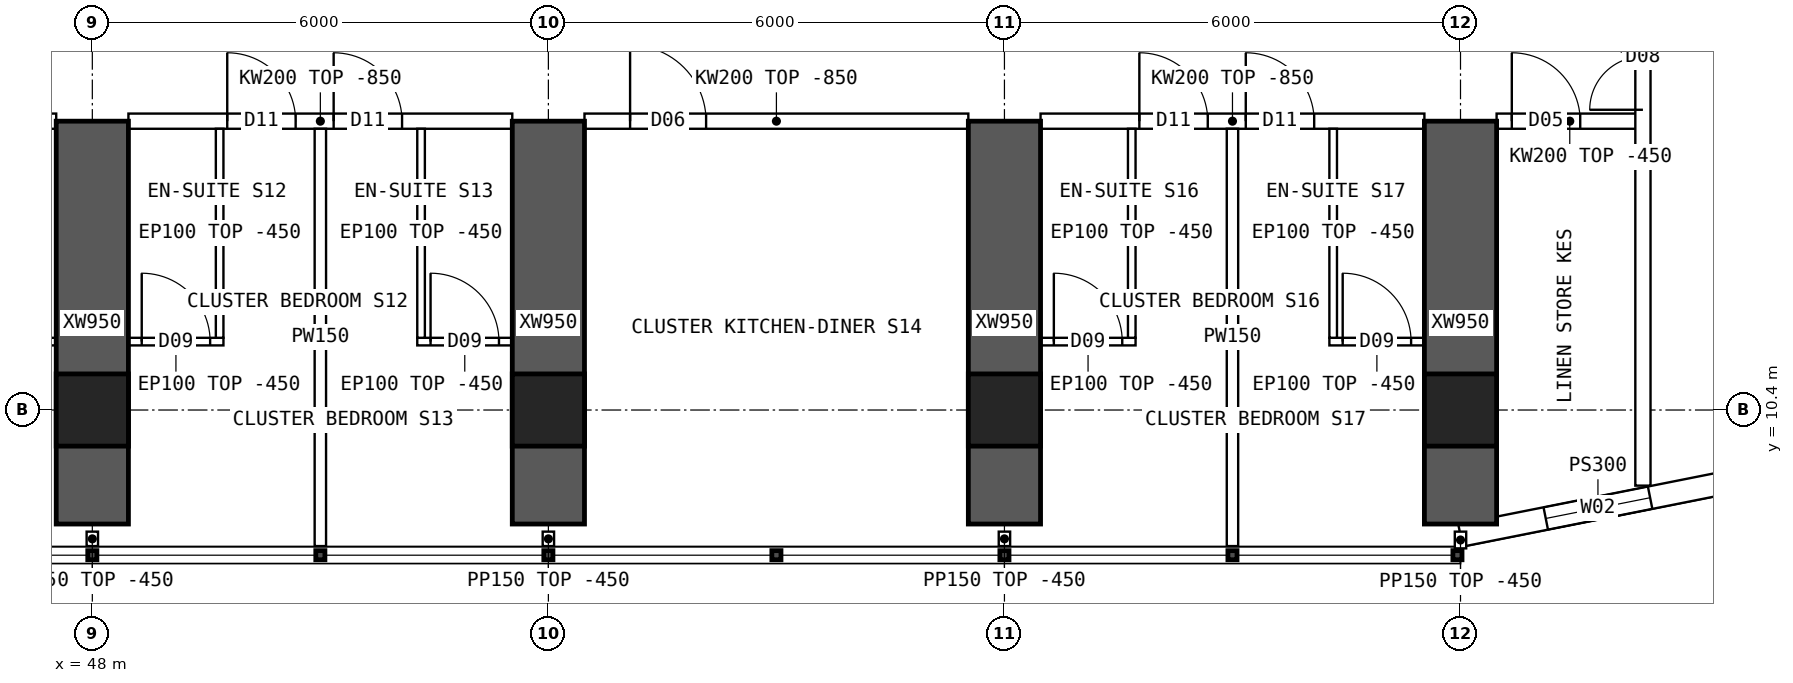
"""IFC4 building model, lengths in metres.
Left out: names, types, materials, properties, quantities, classifications, styles, units other than length and angle.
Written with IfcOpenShell. Run it as: python <this file> out.ifc"""

import sys

from ifc_helpers import new_model, si_unit, direction, frame, frame_2d, origin, origin_2d, place, context, subcontext, project, spatial, polyline, rectangle, hollow_rectangle, outline, extrude, element, fill, save


model = new_model("IFC4")
c1 = context("Model", 3, precision=1e-05, world=origin(), true_north=direction((0.0, 1.0)))
c2 = subcontext(c1, "Body", "Model", "MODEL_VIEW")
j1 = project(units=[si_unit("LENGTHUNIT", "METRE"), si_unit("PLANEANGLEUNIT", "RADIAN")], contexts=[c1])
p1 = place(None, origin())
s1 = spatial("IfcSite", under=j1, at=p1, CompositionType="ELEMENT")
p2 = place(p1, origin())
s2 = spatial("IfcBuilding", under=s1, at=p2, CompositionType="ELEMENT")
p3 = place(p2, frame((0.0, 0.0, 110.65)))
s3 = spatial("IfcBuildingStorey", under=s2, at=p3, CompositionType="ELEMENT", Elevation=110.65)
for number, where, z_axis, x_axis in (
    (1, (48.0, 10.4, 0.0), (0.0, 0.0, 1.0), (1.0, 0.0, 0.0)),
    (2, (54.0, 10.4, 0.0), (0.0, 0.0, 1.0), (1.0, 0.0, 0.0)),
    (3, (60.0, 10.4, 0.0), (0.0, 0.0, 1.0), (1.0, 0.0, 0.0)),
    (4, (66.0, 10.4, 0.0), (0.0, 0.0, 1.0), (1.0, 0.0, 0.0)),
):
    element("IfcColumn", number, at=place(p3, frame(where, z_axis=z_axis, x_axis=x_axis)), inside=s3, PredefinedType="COLUMN", context=c2, shape_type="SweptSolid", body=[
        extrude(hollow_rectangle(XDim=0.95, YDim=0.95, WallThickness=0.095, at=origin_2d()), origin(), (0.0, 0.0, 1.0), 3.75),
    ])
for number, where, z_axis, x_axis in (
    (5, (48.0, 8.9, 0.0), (0.0, 0.0, 1.0), (0.0, 1.0, 0.0)),
    (6, (54.0, 8.9, 0.0), (0.0, 0.0, 1.0), (0.0, 1.0, 0.0)),
    (7, (60.0, 8.9, 0.0), (0.0, 0.0, 1.0), (0.0, 1.0, 0.0)),
    (8, (66.0, 8.9, 0.0), (0.0, 0.0, 1.0), (0.0, 1.0, 0.0)),
):
    element("IfcWall", number, at=place(p3, frame(where, z_axis=z_axis, x_axis=x_axis)), inside=s3, PredefinedType="SHEAR", context=c2, shape_type="SweptSolid", body=[
        extrude(rectangle(XDim=5.3, YDim=0.95, at=frame_2d((2.65, 0.0))), origin(), (0.0, 0.0, 1.0), 3.75),
    ])
p4 = place(p3, frame((66.0, 8.75, 0.0), z_axis=(0.0, 0.0, 1.0), x_axis=(0.980791473772, 0.195059183267, 0.0)))
e9 = element("IfcWall", 9, at=p4, inside=s3, PredefinedType="SOLIDWALL", context=c2, shape_type="SweptSolid", body=[
    extrude(outline(polyline([(-0.03, -0.15), (3.717, -0.15), (3.657, 0.15), (0.03, 0.15), (-0.03, -0.15)])), origin(), (0.0, 0.0, 1.0), 3.3),
])
p5 = place(p4, frame((1.144, 0.0, 0.9)))
e10 = element("IfcOpeningElement", 10, at=p5, cuts=e9, PredefinedType="OPENING", context=c2, shape_type="SweptSolid", body=[
    extrude(rectangle(XDim=1.4, YDim=1.8, at=frame_2d((0.7, 0.9))), frame((0.0, 0.16, 0.0), z_axis=(0.0, -1.0, 0.0), x_axis=(1.0, 0.0, 0.0)), (0.0, 0.0, 1.0), 0.32),
])
p6 = place(p3, frame((42.475, 14.2, 0.0), z_axis=(0.0, 0.0, 1.0), x_axis=(1.0, 0.0, 0.0)))
e11 = element("IfcWall", 11, at=p6, inside=s3, PredefinedType="SOLIDWALL", context=c2, shape_type="SweptSolid", body=[
    extrude(outline(polyline([(0.0, 0.0), (5.05, 0.0), (5.05, 2.9), (0.0, 2.9), (0.0, 0.0)])), frame((0.0, 0.1, 0.0), z_axis=(0.0, -1.0, 0.0), x_axis=(1.0, 0.0, 0.0)), (0.0, 0.0, 1.0), 0.2),
])
p7 = place(p6, frame((1.3, 0.0, 0.0)))
e12 = element("IfcOpeningElement", 12, at=p7, cuts=e11, PredefinedType="OPENING", context=c2, shape_type="SweptSolid", body=[
    extrude(rectangle(XDim=0.9, YDim=2.1, at=frame_2d((0.45, 1.05))), frame((0.0, 0.11, 0.0), z_axis=(0.0, -1.0, 0.0), x_axis=(1.0, 0.0, 0.0)), (0.0, 0.0, 1.0), 0.22),
])
p8 = place(p6, frame((2.7, 0.0, 0.0)))
e13 = element("IfcOpeningElement", 13, at=p8, cuts=e11, PredefinedType="OPENING", context=c2, shape_type="SweptSolid", body=[
    extrude(rectangle(XDim=0.9, YDim=2.1, at=frame_2d((0.45, 1.05))), frame((0.0, 0.11, 0.0), z_axis=(0.0, -1.0, 0.0), x_axis=(1.0, 0.0, 0.0)), (0.0, 0.0, 1.0), 0.22),
])
p9 = place(p3, frame((48.475, 14.2, 0.0), z_axis=(0.0, 0.0, 1.0), x_axis=(1.0, 0.0, 0.0)))
e14 = element("IfcWall", 14, at=p9, inside=s3, PredefinedType="SOLIDWALL", context=c2, shape_type="SweptSolid", body=[
    extrude(outline(polyline([(0.0, 0.0), (5.05, 0.0), (5.05, 2.9), (0.0, 2.9), (0.0, 0.0)])), frame((0.0, 0.1, 0.0), z_axis=(0.0, -1.0, 0.0), x_axis=(1.0, 0.0, 0.0)), (0.0, 0.0, 1.0), 0.2),
])
p10 = place(p9, frame((1.3, 0.0, 0.0)))
e15 = element("IfcOpeningElement", 15, at=p10, cuts=e14, PredefinedType="OPENING", context=c2, shape_type="SweptSolid", body=[
    extrude(rectangle(XDim=0.9, YDim=2.1, at=frame_2d((0.45, 1.05))), frame((0.0, 0.11, 0.0), z_axis=(0.0, -1.0, 0.0), x_axis=(1.0, 0.0, 0.0)), (0.0, 0.0, 1.0), 0.22),
])
p11 = place(p9, frame((2.7, 0.0, 0.0)))
e16 = element("IfcOpeningElement", 16, at=p11, cuts=e14, PredefinedType="OPENING", context=c2, shape_type="SweptSolid", body=[
    extrude(rectangle(XDim=0.9, YDim=2.1, at=frame_2d((0.45, 1.05))), frame((0.0, 0.11, 0.0), z_axis=(0.0, -1.0, 0.0), x_axis=(1.0, 0.0, 0.0)), (0.0, 0.0, 1.0), 0.22),
])
p12 = place(p3, frame((54.475, 14.2, 0.0), z_axis=(0.0, 0.0, 1.0), x_axis=(1.0, 0.0, 0.0)))
e17 = element("IfcWall", 17, at=p12, inside=s3, PredefinedType="SOLIDWALL", context=c2, shape_type="SweptSolid", body=[
    extrude(outline(polyline([(0.0, 0.0), (5.05, 0.0), (5.05, 2.9), (0.0, 2.9), (0.0, 0.0)])), frame((0.0, 0.1, 0.0), z_axis=(0.0, -1.0, 0.0), x_axis=(1.0, 0.0, 0.0)), (0.0, 0.0, 1.0), 0.2),
])
p13 = place(p12, frame((0.6, 0.0, 0.0)))
e18 = element("IfcOpeningElement", 18, at=p13, cuts=e17, PredefinedType="OPENING", context=c2, shape_type="SweptSolid", body=[
    extrude(rectangle(XDim=1.0, YDim=2.1, at=frame_2d((0.5, 1.05))), frame((0.0, 0.11, 0.0), z_axis=(0.0, -1.0, 0.0), x_axis=(1.0, 0.0, 0.0)), (0.0, 0.0, 1.0), 0.22),
])
p14 = place(p3, frame((60.475, 14.2, 0.0), z_axis=(0.0, 0.0, 1.0), x_axis=(1.0, 0.0, 0.0)))
e19 = element("IfcWall", 19, at=p14, inside=s3, PredefinedType="SOLIDWALL", context=c2, shape_type="SweptSolid", body=[
    extrude(outline(polyline([(0.0, 0.0), (5.05, 0.0), (5.05, 2.9), (0.0, 2.9), (0.0, 0.0)])), frame((0.0, 0.1, 0.0), z_axis=(0.0, -1.0, 0.0), x_axis=(1.0, 0.0, 0.0)), (0.0, 0.0, 1.0), 0.2),
])
p15 = place(p14, frame((1.3, 0.0, 0.0)))
e20 = element("IfcOpeningElement", 20, at=p15, cuts=e19, PredefinedType="OPENING", context=c2, shape_type="SweptSolid", body=[
    extrude(rectangle(XDim=0.9, YDim=2.1, at=frame_2d((0.45, 1.05))), frame((0.0, 0.11, 0.0), z_axis=(0.0, -1.0, 0.0), x_axis=(1.0, 0.0, 0.0)), (0.0, 0.0, 1.0), 0.22),
])
p16 = place(p14, frame((2.7, 0.0, 0.0)))
e21 = element("IfcOpeningElement", 21, at=p16, cuts=e19, PredefinedType="OPENING", context=c2, shape_type="SweptSolid", body=[
    extrude(rectangle(XDim=0.9, YDim=2.1, at=frame_2d((0.45, 1.05))), frame((0.0, 0.11, 0.0), z_axis=(0.0, -1.0, 0.0), x_axis=(1.0, 0.0, 0.0)), (0.0, 0.0, 1.0), 0.22),
])
p17 = place(p3, frame((66.475, 14.2, 0.0), z_axis=(0.0, 0.0, 1.0), x_axis=(1.0, 0.0, 0.0)))
e22 = element("IfcWall", 22, at=p17, inside=s3, PredefinedType="SOLIDWALL", context=c2, shape_type="SweptSolid", body=[
    extrude(rectangle(XDim=1.925, YDim=0.2, at=frame_2d((0.962, 0.0))), origin(), (0.0, 0.0, 1.0), 3.3),
])
p18 = place(p17, frame((0.2, 0.0, 0.0)))
e23 = element("IfcOpeningElement", 23, at=p18, cuts=e22, PredefinedType="OPENING", context=c2, shape_type="SweptSolid", body=[
    extrude(rectangle(XDim=0.9, YDim=2.1, at=frame_2d((0.45, 1.05))), frame((0.0, 0.11, 0.0), z_axis=(0.0, -1.0, 0.0), x_axis=(1.0, 0.0, 0.0)), (0.0, 0.0, 1.0), 0.22),
])
p19 = place(p3, frame((47.525, 11.3, 0.0), z_axis=(0.0, 0.0, 1.0), x_axis=(-1.0, 0.0, 0.0)))
e24 = element("IfcWall", 24, at=p19, inside=s3, PredefinedType="PARTITIONING", context=c2, shape_type="SweptSolid", body=[
    extrude(rectangle(XDim=1.25, YDim=0.1, at=frame_2d((0.625, 0.0))), origin(), (0.0, 0.0, 1.0), 3.3),
])
p20 = place(p19, frame((0.175, 0.0, 0.0)))
e25 = element("IfcOpeningElement", 25, at=p20, cuts=e24, PredefinedType="OPENING", context=c2, shape_type="SweptSolid", body=[
    extrude(rectangle(XDim=0.9, YDim=2.1, at=frame_2d((0.45, 1.05))), frame((0.0, 0.06, 0.0), z_axis=(0.0, -1.0, 0.0), x_axis=(1.0, 0.0, 0.0)), (0.0, 0.0, 1.0), 0.12),
])
p21 = place(p3, frame((51.0, 8.61, 0.0), z_axis=(0.0, 0.0, 1.0), x_axis=(0.0, 1.0, 0.0)))
e26 = element("IfcWall", 26, at=p21, inside=s3, PredefinedType="PARTITIONING", context=c2, shape_type="SweptSolid", body=[
    extrude(outline(polyline([(0.0, 0.0), (5.49, 0.0), (5.49, 2.9), (5.442, 2.9), (5.44, 3.3), (1.992, 3.3), (1.99, 2.9), (1.592, 2.9), (1.59, 3.3), (0.0, 3.3), (0.0, 0.0)])), frame((0.0, 0.075, 0.0), z_axis=(0.0, -1.0, 0.0), x_axis=(1.0, 0.0, 0.0)), (0.0, 0.0, 1.0), 0.15),
])
p22 = place(p3, frame((49.725, 11.3, 0.0), z_axis=(0.0, 0.0, 1.0), x_axis=(-1.0, 0.0, 0.0)))
e27 = element("IfcWall", 27, at=p22, inside=s3, PredefinedType="PARTITIONING", context=c2, shape_type="SweptSolid", body=[
    extrude(rectangle(XDim=1.25, YDim=0.1, at=frame_2d((0.625, 0.0))), origin(), (0.0, 0.0, 1.0), 3.3),
])
p23 = place(p22, frame((0.175, 0.0, 0.0)))
e28 = element("IfcOpeningElement", 28, at=p23, cuts=e27, PredefinedType="OPENING", context=c2, shape_type="SweptSolid", body=[
    extrude(rectangle(XDim=0.9, YDim=2.1, at=frame_2d((0.45, 1.05))), frame((0.0, 0.06, 0.0), z_axis=(0.0, -1.0, 0.0), x_axis=(1.0, 0.0, 0.0)), (0.0, 0.0, 1.0), 0.12),
])
p24 = place(p3, frame((49.675, 11.35, 0.0), z_axis=(0.0, 0.0, 1.0), x_axis=(0.0, 1.0, 0.0)))
e29 = element("IfcWall", 29, at=p24, inside=s3, PredefinedType="PARTITIONING", context=c2, shape_type="SweptSolid", body=[
    extrude(outline(polyline([(0.0, 0.0), (2.75, 0.0), (2.75, 2.9), (2.702, 2.9), (2.7, 3.3), (0.0, 3.3), (0.0, 0.0)])), frame((0.0, 0.05, 0.0), z_axis=(0.0, -1.0, 0.0), x_axis=(1.0, 0.0, 0.0)), (0.0, 0.0, 1.0), 0.1),
])
p25 = place(p3, frame((53.525, 11.3, 0.0), z_axis=(0.0, 0.0, 1.0), x_axis=(-1.0, 0.0, 0.0)))
e30 = element("IfcWall", 30, at=p25, inside=s3, PredefinedType="PARTITIONING", context=c2, shape_type="SweptSolid", body=[
    extrude(rectangle(XDim=1.25, YDim=0.1, at=frame_2d((0.625, 0.0))), origin(), (0.0, 0.0, 1.0), 3.3),
])
p26 = place(p25, frame((0.175, 0.0, 0.0)))
e31 = element("IfcOpeningElement", 31, at=p26, cuts=e30, PredefinedType="OPENING", context=c2, shape_type="SweptSolid", body=[
    extrude(rectangle(XDim=0.9, YDim=2.1, at=frame_2d((0.45, 1.05))), frame((0.0, 0.06, 0.0), z_axis=(0.0, -1.0, 0.0), x_axis=(1.0, 0.0, 0.0)), (0.0, 0.0, 1.0), 0.12),
])
p27 = place(p3, frame((52.325, 11.35, 0.0), z_axis=(0.0, 0.0, 1.0), x_axis=(0.0, 1.0, 0.0)))
e32 = element("IfcWall", 32, at=p27, inside=s3, PredefinedType="PARTITIONING", context=c2, shape_type="SweptSolid", body=[
    extrude(outline(polyline([(0.0, 0.0), (2.75, 0.0), (2.75, 2.9), (2.702, 2.9), (2.7, 3.3), (0.0, 3.3), (0.0, 0.0)])), frame((0.0, 0.05, 0.0), z_axis=(0.0, -1.0, 0.0), x_axis=(1.0, 0.0, 0.0)), (0.0, 0.0, 1.0), 0.1),
])
p28 = place(p3, frame((63.0, 8.61, 0.0), z_axis=(0.0, 0.0, 1.0), x_axis=(0.0, 1.0, 0.0)))
e33 = element("IfcWall", 33, at=p28, inside=s3, PredefinedType="PARTITIONING", context=c2, shape_type="SweptSolid", body=[
    extrude(outline(polyline([(0.0, 0.0), (5.49, 0.0), (5.49, 2.9), (5.442, 2.9), (5.44, 3.3), (1.992, 3.3), (1.99, 2.9), (1.592, 2.9), (1.59, 3.3), (0.0, 3.3), (0.0, 0.0)])), frame((0.0, 0.075, 0.0), z_axis=(0.0, -1.0, 0.0), x_axis=(1.0, 0.0, 0.0)), (0.0, 0.0, 1.0), 0.15),
])
p29 = place(p3, frame((61.725, 11.3, 0.0), z_axis=(0.0, 0.0, 1.0), x_axis=(-1.0, 0.0, 0.0)))
e34 = element("IfcWall", 34, at=p29, inside=s3, PredefinedType="PARTITIONING", context=c2, shape_type="SweptSolid", body=[
    extrude(rectangle(XDim=1.25, YDim=0.1, at=frame_2d((0.625, 0.0))), origin(), (0.0, 0.0, 1.0), 3.3),
])
p30 = place(p29, frame((0.175, 0.0, 0.0)))
e35 = element("IfcOpeningElement", 35, at=p30, cuts=e34, PredefinedType="OPENING", context=c2, shape_type="SweptSolid", body=[
    extrude(rectangle(XDim=0.9, YDim=2.1, at=frame_2d((0.45, 1.05))), frame((0.0, 0.06, 0.0), z_axis=(0.0, -1.0, 0.0), x_axis=(1.0, 0.0, 0.0)), (0.0, 0.0, 1.0), 0.12),
])
p31 = place(p3, frame((61.675, 11.35, 0.0), z_axis=(0.0, 0.0, 1.0), x_axis=(0.0, 1.0, 0.0)))
e36 = element("IfcWall", 36, at=p31, inside=s3, PredefinedType="PARTITIONING", context=c2, shape_type="SweptSolid", body=[
    extrude(outline(polyline([(0.0, 0.0), (2.75, 0.0), (2.75, 2.9), (2.702, 2.9), (2.7, 3.3), (0.0, 3.3), (0.0, 0.0)])), frame((0.0, 0.05, 0.0), z_axis=(0.0, -1.0, 0.0), x_axis=(1.0, 0.0, 0.0)), (0.0, 0.0, 1.0), 0.1),
])
p32 = place(p3, frame((65.525, 11.3, 0.0), z_axis=(0.0, 0.0, 1.0), x_axis=(-1.0, 0.0, 0.0)))
e37 = element("IfcWall", 37, at=p32, inside=s3, PredefinedType="PARTITIONING", context=c2, shape_type="SweptSolid", body=[
    extrude(rectangle(XDim=1.25, YDim=0.1, at=frame_2d((0.625, 0.0))), origin(), (0.0, 0.0, 1.0), 3.3),
])
p33 = place(p32, frame((0.175, 0.0, 0.0)))
e38 = element("IfcOpeningElement", 38, at=p33, cuts=e37, PredefinedType="OPENING", context=c2, shape_type="SweptSolid", body=[
    extrude(rectangle(XDim=0.9, YDim=2.1, at=frame_2d((0.45, 1.05))), frame((0.0, 0.06, 0.0), z_axis=(0.0, -1.0, 0.0), x_axis=(1.0, 0.0, 0.0)), (0.0, 0.0, 1.0), 0.12),
])
p34 = place(p3, frame((64.325, 11.35, 0.0), z_axis=(0.0, 0.0, 1.0), x_axis=(0.0, 1.0, 0.0)))
e39 = element("IfcWall", 39, at=p34, inside=s3, PredefinedType="PARTITIONING", context=c2, shape_type="SweptSolid", body=[
    extrude(outline(polyline([(0.0, 0.0), (2.75, 0.0), (2.75, 2.9), (2.702, 2.9), (2.7, 3.3), (0.0, 3.3), (0.0, 0.0)])), frame((0.0, 0.05, 0.0), z_axis=(0.0, -1.0, 0.0), x_axis=(1.0, 0.0, 0.0)), (0.0, 0.0, 1.0), 0.1),
])
p35 = place(p3, frame((68.4, 9.405, 0.0), z_axis=(0.0, 0.0, 1.0), x_axis=(0.0, 1.0, 0.0)))
e40 = element("IfcWall", 40, at=p35, inside=s3, PredefinedType="SOLIDWALL", context=c2, shape_type="SweptSolid", body=[
    extrude(rectangle(XDim=45.189, YDim=0.2, at=frame_2d((22.595, 0.0))), origin(), (0.0, 0.0, 1.0), 3.3),
])
p36 = place(p35, frame((25.595, 0.0, 0.0)))
e41 = element("IfcOpeningElement", 41, at=p36, cuts=e40, PredefinedType="OPENING", context=c2, shape_type="SweptSolid", body=[
    extrude(rectangle(XDim=1.2, YDim=2.1, at=frame_2d((0.6, 1.05))), frame((0.0, 0.11, 0.0), z_axis=(0.0, -1.0, 0.0), x_axis=(1.0, 0.0, 0.0)), (0.0, 0.0, 1.0), 0.22),
])
p37 = place(p35, frame((4.945, 0.0, 0.0)))
e42 = element("IfcOpeningElement", 42, at=p37, cuts=e40, PredefinedType="OPENING", context=c2, shape_type="SweptSolid", body=[
    extrude(rectangle(XDim=1.4, YDim=2.1, at=frame_2d((0.7, 1.05))), frame((0.0, 0.11, 0.0), z_axis=(0.0, -1.0, 0.0), x_axis=(1.0, 0.0, 0.0)), (0.0, 0.0, 1.0), 0.22),
])
p38 = place(p35, frame((38.745, 0.0, 0.0)))
e43 = element("IfcOpeningElement", 43, at=p38, cuts=e40, PredefinedType="OPENING", context=c2, shape_type="SweptSolid", body=[
    extrude(rectangle(XDim=1.4, YDim=2.1, at=frame_2d((0.7, 1.05))), frame((0.0, 0.11, 0.0), z_axis=(0.0, -1.0, 0.0), x_axis=(1.0, 0.0, 0.0)), (0.0, 0.0, 1.0), 0.22),
])
for number, where, z_axis, x_axis in (
    (44, (48.0, 8.8, 0.0), (0.0, 0.0, 1.0), (0.0, -1.0, 0.0)),
    (45, (54.0, 8.8, 0.0), (0.0, 0.0, 1.0), (0.0, -1.0, 0.0)),
    (46, (60.0, 8.8, 0.0), (0.0, 0.0, 1.0), (0.0, -1.0, 0.0)),
):
    element("IfcWall", number, at=place(p3, frame(where, z_axis=z_axis, x_axis=x_axis)), inside=s3, PredefinedType="PARTITIONING", context=c2, shape_type="SweptSolid", body=[
        extrude(rectangle(XDim=0.19, YDim=0.15, at=frame_2d((0.095, 0.0))), origin(), (0.0, 0.0, 1.0), 3.3),
    ])
p39 = place(p3, frame((66.0, 8.8, 0.0), z_axis=(0.0, 0.0, 1.0), x_axis=(0.0, -1.0, 0.0)))
e47 = element("IfcWall", 47, at=p39, inside=s3, PredefinedType="PARTITIONING", context=c2, shape_type="SweptSolid", body=[
    extrude(rectangle(XDim=0.22, YDim=0.15, at=frame_2d((0.11, 0.0))), origin(), (0.0, 0.0, 1.0), 3.3),
])
p40 = place(p5, origin())
e48 = element("IfcWindow", 48, at=p40, inside=s3, PartitioningType="SINGLE_PANEL", PredefinedType="WINDOW", context=c2, shape_type="SweptSolid", body=[
    extrude(rectangle(XDim=1.4, YDim=1.8, at=frame_2d((0.7, 0.9))), frame((0.0, 0.03, 0.0), z_axis=(0.0, -1.0, 0.0), x_axis=(1.0, 0.0, 0.0)), (0.0, 0.0, 1.0), 0.06),
])
fill(e10, e48)
p41 = place(p23, origin())
e49 = element("IfcDoor", 49, at=p41, inside=s3, OperationType="SINGLE_SWING_RIGHT", PredefinedType="DOOR", context=c2, shape_type="SweptSolid", body=[
    extrude(rectangle(XDim=0.9, YDim=2.1, at=frame_2d((0.45, 1.05))), frame((0.0, 0.025, 0.0), z_axis=(0.0, -1.0, 0.0), x_axis=(1.0, 0.0, 0.0)), (0.0, 0.0, 1.0), 0.05),
])
fill(e28, e49)
p42 = place(p10, origin())
e50 = element("IfcDoor", 50, at=p42, inside=s3, OperationType="SINGLE_SWING_LEFT", PredefinedType="DOOR", context=c2, shape_type="SweptSolid", body=[
    extrude(rectangle(XDim=0.9, YDim=2.1, at=frame_2d((0.45, 1.05))), frame((0.0, 0.025, 0.0), z_axis=(0.0, -1.0, 0.0), x_axis=(1.0, 0.0, 0.0)), (0.0, 0.0, 1.0), 0.05),
])
fill(e15, e50)
p43 = place(p26, origin())
e51 = element("IfcDoor", 51, at=p43, inside=s3, OperationType="SINGLE_SWING_RIGHT", PredefinedType="DOOR", context=c2, shape_type="SweptSolid", body=[
    extrude(rectangle(XDim=0.9, YDim=2.1, at=frame_2d((0.45, 1.05))), frame((0.0, 0.025, 0.0), z_axis=(0.0, -1.0, 0.0), x_axis=(1.0, 0.0, 0.0)), (0.0, 0.0, 1.0), 0.05),
])
fill(e31, e51)
p44 = place(p11, origin())
e52 = element("IfcDoor", 52, at=p44, inside=s3, OperationType="SINGLE_SWING_LEFT", PredefinedType="DOOR", context=c2, shape_type="SweptSolid", body=[
    extrude(rectangle(XDim=0.9, YDim=2.1, at=frame_2d((0.45, 1.05))), frame((0.0, 0.025, 0.0), z_axis=(0.0, -1.0, 0.0), x_axis=(1.0, 0.0, 0.0)), (0.0, 0.0, 1.0), 0.05),
])
fill(e16, e52)
p45 = place(p13, origin())
e53 = element("IfcDoor", 53, at=p45, inside=s3, OperationType="SINGLE_SWING_LEFT", PredefinedType="DOOR", context=c2, shape_type="SweptSolid", body=[
    extrude(rectangle(XDim=1.0, YDim=2.1, at=frame_2d((0.5, 1.05))), frame((0.0, 0.025, 0.0), z_axis=(0.0, -1.0, 0.0), x_axis=(1.0, 0.0, 0.0)), (0.0, 0.0, 1.0), 0.05),
])
fill(e18, e53)
p46 = place(p30, origin())
e54 = element("IfcDoor", 54, at=p46, inside=s3, OperationType="SINGLE_SWING_RIGHT", PredefinedType="DOOR", context=c2, shape_type="SweptSolid", body=[
    extrude(rectangle(XDim=0.9, YDim=2.1, at=frame_2d((0.45, 1.05))), frame((0.0, 0.025, 0.0), z_axis=(0.0, -1.0, 0.0), x_axis=(1.0, 0.0, 0.0)), (0.0, 0.0, 1.0), 0.05),
])
fill(e35, e54)
p47 = place(p15, origin())
e55 = element("IfcDoor", 55, at=p47, inside=s3, OperationType="SINGLE_SWING_LEFT", PredefinedType="DOOR", context=c2, shape_type="SweptSolid", body=[
    extrude(rectangle(XDim=0.9, YDim=2.1, at=frame_2d((0.45, 1.05))), frame((0.0, 0.025, 0.0), z_axis=(0.0, -1.0, 0.0), x_axis=(1.0, 0.0, 0.0)), (0.0, 0.0, 1.0), 0.05),
])
fill(e20, e55)
p48 = place(p33, origin())
e56 = element("IfcDoor", 56, at=p48, inside=s3, OperationType="SINGLE_SWING_RIGHT", PredefinedType="DOOR", context=c2, shape_type="SweptSolid", body=[
    extrude(rectangle(XDim=0.9, YDim=2.1, at=frame_2d((0.45, 1.05))), frame((0.0, 0.025, 0.0), z_axis=(0.0, -1.0, 0.0), x_axis=(1.0, 0.0, 0.0)), (0.0, 0.0, 1.0), 0.05),
])
fill(e38, e56)
p49 = place(p16, origin())
e57 = element("IfcDoor", 57, at=p49, inside=s3, OperationType="SINGLE_SWING_LEFT", PredefinedType="DOOR", context=c2, shape_type="SweptSolid", body=[
    extrude(rectangle(XDim=0.9, YDim=2.1, at=frame_2d((0.45, 1.05))), frame((0.0, 0.025, 0.0), z_axis=(0.0, -1.0, 0.0), x_axis=(1.0, 0.0, 0.0)), (0.0, 0.0, 1.0), 0.05),
])
fill(e21, e57)
p50 = place(p37, origin())
e58 = element("IfcDoor", 58, at=p50, inside=s3, OperationType="DOUBLE_DOOR_SINGLE_SWING", PredefinedType="DOOR", context=c2, shape_type="SweptSolid", body=[
    extrude(rectangle(XDim=1.4, YDim=2.1, at=frame_2d((0.7, 1.05))), frame((0.0, 0.025, 0.0), z_axis=(0.0, -1.0, 0.0), x_axis=(1.0, 0.0, 0.0)), (0.0, 0.0, 1.0), 0.05),
])
fill(e42, e58)
p51 = place(p18, origin())
e59 = element("IfcDoor", 59, at=p51, inside=s3, OperationType="SINGLE_SWING_LEFT", PredefinedType="DOOR", context=c2, shape_type="SweptSolid", body=[
    extrude(rectangle(XDim=0.9, YDim=2.1, at=frame_2d((0.45, 1.05))), frame((0.0, 0.025, 0.0), z_axis=(0.0, -1.0, 0.0), x_axis=(1.0, 0.0, 0.0)), (0.0, 0.0, 1.0), 0.05),
])
fill(e23, e59)
save(model, sys.argv[1])
